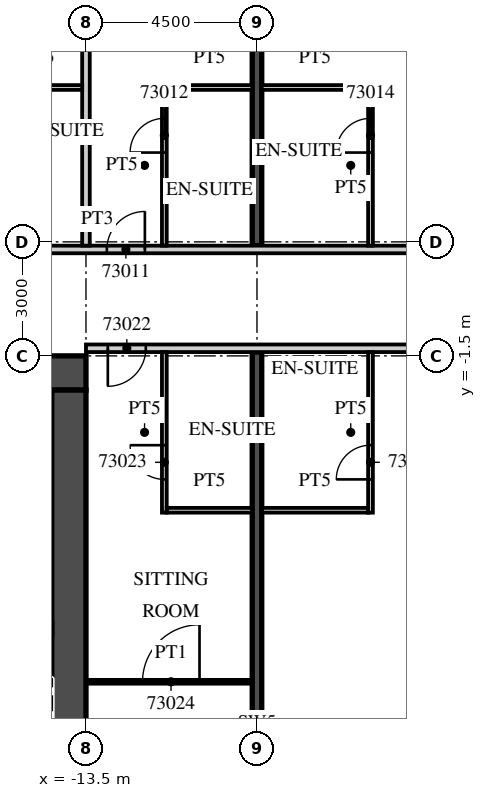
"""IFC4 building model, lengths in metres.
Left out: names, types, materials, properties, quantities, classifications, styles, units other than length and angle.
Written with IfcOpenShell. Run it as: python <this file> out.ifc"""

import sys

from ifc_helpers import new_model, si_unit, direction, frame, frame_2d, origin, place, context, subcontext, project, spatial, rectangle, extrude, element, fill, save


model = new_model("IFC4")
c1 = context("Model", 3, precision=1e-05, world=origin(), true_north=direction((0.0, 1.0)))
c2 = subcontext(c1, "Body", "Model", "MODEL_VIEW")
j1 = project(units=[si_unit("LENGTHUNIT", "METRE"), si_unit("PLANEANGLEUNIT", "RADIAN")], contexts=[c1])
p1 = place(None, origin())
s1 = spatial("IfcSite", under=j1, at=p1, CompositionType="ELEMENT")
p2 = place(p1, origin())
s2 = spatial("IfcBuilding", under=s1, at=p2, CompositionType="ELEMENT")
p3 = place(p2, frame((0.0, 0.0, 291.6)))
s3 = spatial("IfcBuildingStorey", under=s2, at=p3, CompositionType="ELEMENT", Elevation=291.6)
p4 = place(p3, frame((-9.0, -20.94, 0.0), z_axis=(0.0, 0.0, 1.0), x_axis=(0.0, 1.0, 0.0)))
e1 = element("IfcWall", 1, at=p4, inside=s3, PredefinedType="SHEAR", context=c2, shape_type="SweptSolid", body=[
    extrude(rectangle(XDim=19.541, YDim=0.25, at=frame_2d((9.77, 0.0))), origin(), (0.0, 0.0, 1.0), 3.3),
])
p5 = place(p3, frame((-9.0, 1.4, 0.0), z_axis=(0.0, 0.0, 1.0), x_axis=(0.0, 1.0, 0.0)))
e2 = element("IfcWall", 2, at=p5, inside=s3, PredefinedType="SHEAR", context=c2, shape_type="SweptSolid", body=[
    extrude(rectangle(XDim=16.896, YDim=0.25, at=frame_2d((8.448, 0.0))), origin(), (0.0, 0.0, 1.0), 3.3),
])
p6 = place(p3, frame((-39.909, 1.3, 0.0), z_axis=(0.0, 0.0, 1.0), x_axis=(1.0, 0.0, 0.0)))
e3 = element("IfcWall", 3, at=p6, inside=s3, PredefinedType="PARTITIONING", context=c2, shape_type="SweptSolid", body=[
    extrude(rectangle(XDim=53.409, YDim=0.2, at=frame_2d((26.705, 0.0))), origin(), (0.0, 0.0, 1.0), 3.02),
])
p7 = place(p6, frame((0.255, 0.0, 0.0)))
e4 = element("IfcOpeningElement", 4, at=p7, cuts=e3, PredefinedType="OPENING", context=c2, shape_type="SweptSolid", body=[
    extrude(rectangle(XDim=0.9, YDim=2.1, at=frame_2d((0.45, 1.05))), frame((0.0, 0.11, 0.0), z_axis=(0.0, -1.0, 0.0), x_axis=(1.0, 0.0, 0.0)), (0.0, 0.0, 1.0), 0.22),
])
p8 = place(p6, frame((6.347, 0.0, 0.0)))
e5 = element("IfcOpeningElement", 5, at=p8, cuts=e3, PredefinedType="OPENING", context=c2, shape_type="SweptSolid", body=[
    extrude(rectangle(XDim=1.2, YDim=2.1, at=frame_2d((0.6, 1.05))), frame((0.0, 0.11, 0.0), z_axis=(0.0, -1.0, 0.0), x_axis=(1.0, 0.0, 0.0)), (0.0, 0.0, 1.0), 0.22),
])
p9 = place(p6, frame((13.484, 0.0, 0.0)))
e6 = element("IfcOpeningElement", 6, at=p9, cuts=e3, PredefinedType="OPENING", context=c2, shape_type="SweptSolid", body=[
    extrude(rectangle(XDim=1.0, YDim=2.1, at=frame_2d((0.5, 1.05))), frame((0.0, 0.11, 0.0), z_axis=(0.0, -1.0, 0.0), x_axis=(1.0, 0.0, 0.0)), (0.0, 0.0, 1.0), 0.22),
])
p10 = place(p6, frame((20.334, 0.0, 0.0)))
e7 = element("IfcOpeningElement", 7, at=p10, cuts=e3, PredefinedType="OPENING", context=c2, shape_type="SweptSolid", body=[
    extrude(rectangle(XDim=1.0, YDim=2.1, at=frame_2d((0.5, 1.05))), frame((0.0, 0.11, 0.0), z_axis=(0.0, -1.0, 0.0), x_axis=(1.0, 0.0, 0.0)), (0.0, 0.0, 1.0), 0.22),
])
p11 = place(p6, frame((22.484, 0.0, 0.0)))
e8 = element("IfcOpeningElement", 8, at=p11, cuts=e3, PredefinedType="OPENING", context=c2, shape_type="SweptSolid", body=[
    extrude(rectangle(XDim=1.0, YDim=2.1, at=frame_2d((0.5, 1.05))), frame((0.0, 0.11, 0.0), z_axis=(0.0, -1.0, 0.0), x_axis=(1.0, 0.0, 0.0)), (0.0, 0.0, 1.0), 0.22),
])
p12 = place(p6, frame((26.959, 0.0, 0.0)))
e9 = element("IfcOpeningElement", 9, at=p12, cuts=e3, PredefinedType="OPENING", context=c2, shape_type="SweptSolid", body=[
    extrude(rectangle(XDim=1.0, YDim=2.1, at=frame_2d((0.5, 1.05))), frame((0.0, 0.11, 0.0), z_axis=(0.0, -1.0, 0.0), x_axis=(1.0, 0.0, 0.0)), (0.0, 0.0, 1.0), 0.22),
])
p13 = place(p6, frame((36.271, 0.0, 0.0)))
e10 = element("IfcOpeningElement", 10, at=p13, cuts=e3, PredefinedType="OPENING", context=c2, shape_type="SweptSolid", body=[
    extrude(rectangle(XDim=1.2, YDim=2.1, at=frame_2d((0.6, 1.05))), frame((0.0, 0.11, 0.0), z_axis=(0.0, -1.0, 0.0), x_axis=(1.0, 0.0, 0.0)), (0.0, 0.0, 1.0), 0.22),
])
p14 = place(p6, frame((40.484, 0.0, 0.0)))
e11 = element("IfcOpeningElement", 11, at=p14, cuts=e3, PredefinedType="OPENING", context=c2, shape_type="SweptSolid", body=[
    extrude(rectangle(XDim=1.0, YDim=2.1, at=frame_2d((0.5, 1.05))), frame((0.0, 0.11, 0.0), z_axis=(0.0, -1.0, 0.0), x_axis=(1.0, 0.0, 0.0)), (0.0, 0.0, 1.0), 0.22),
])
p15 = place(p6, frame((44.959, 0.0, 0.0)))
e12 = element("IfcOpeningElement", 12, at=p15, cuts=e3, PredefinedType="OPENING", context=c2, shape_type="SweptSolid", body=[
    extrude(rectangle(XDim=1.0, YDim=2.1, at=frame_2d((0.5, 1.05))), frame((0.0, 0.11, 0.0), z_axis=(0.0, -1.0, 0.0), x_axis=(1.0, 0.0, 0.0)), (0.0, 0.0, 1.0), 0.22),
])
p16 = place(p6, frame((51.834, 0.0, 0.0)))
e13 = element("IfcOpeningElement", 13, at=p16, cuts=e3, PredefinedType="OPENING", context=c2, shape_type="SweptSolid", body=[
    extrude(rectangle(XDim=1.0, YDim=2.1, at=frame_2d((0.5, 1.05))), frame((0.0, 0.11, 0.0), z_axis=(0.0, -1.0, 0.0), x_axis=(1.0, 0.0, 0.0)), (0.0, 0.0, 1.0), 0.22),
])
p17 = place(p3, frame((-13.5, 1.4, 0.0), z_axis=(0.0, 0.0, 1.0), x_axis=(0.0, 1.0, 0.0)))
e14 = element("IfcWall", 14, at=p17, inside=s3, PredefinedType="PARTITIONING", context=c2, shape_type="SweptSolid", body=[
    extrude(rectangle(XDim=16.485, YDim=0.2, at=frame_2d((8.243, 0.0))), origin(), (0.0, 0.0, 1.0), 3.02),
])
p18 = place(p3, frame((-15.85, 5.562, 0.0), z_axis=(0.0, 0.0, 1.0), x_axis=(1.0, 0.0, 0.0)))
e15 = element("IfcWall", 15, at=p18, inside=s3, PredefinedType="PARTITIONING", context=c2, shape_type="SweptSolid", body=[
    extrude(rectangle(XDim=2.25, YDim=0.125, at=frame_2d((1.125, 0.0))), origin(), (0.0, 0.0, 1.0), 3.02),
])
p19 = place(p3, frame((-11.438, 1.4, 0.0), z_axis=(0.0, 0.0, 1.0), x_axis=(0.0, 1.0, 0.0)))
e16 = element("IfcWall", 16, at=p19, inside=s3, PredefinedType="PARTITIONING", context=c2, shape_type="SweptSolid", body=[
    extrude(rectangle(XDim=4.225, YDim=0.125, at=frame_2d((2.113, 0.0))), origin(), (0.0, 0.0, 1.0), 3.02),
])
p20 = place(p19, frame((2.45, 0.0, 0.0)))
e17 = element("IfcOpeningElement", 17, at=p20, cuts=e16, PredefinedType="OPENING", context=c2, shape_type="SweptSolid", body=[
    extrude(rectangle(XDim=0.9, YDim=2.1, at=frame_2d((0.45, 1.05))), frame((0.0, 0.073, 0.0), z_axis=(0.0, -1.0, 0.0), x_axis=(1.0, 0.0, 0.0)), (0.0, 0.0, 1.0), 0.145),
])
p21 = place(p3, frame((-11.375, 5.562, 0.0), z_axis=(0.0, 0.0, 1.0), x_axis=(1.0, 0.0, 0.0)))
e18 = element("IfcWall", 18, at=p21, inside=s3, PredefinedType="PARTITIONING", context=c2, shape_type="SweptSolid", body=[
    extrude(rectangle(XDim=2.25, YDim=0.125, at=frame_2d((1.125, 0.0))), origin(), (0.0, 0.0, 1.0), 3.02),
])
p22 = place(p3, frame((-6.013, 1.4, 0.0), z_axis=(0.0, 0.0, 1.0), x_axis=(0.0, 1.0, 0.0)))
e19 = element("IfcWall", 19, at=p22, inside=s3, PredefinedType="PARTITIONING", context=c2, shape_type="SweptSolid", body=[
    extrude(rectangle(XDim=4.225, YDim=0.125, at=frame_2d((2.113, 0.0))), origin(), (0.0, 0.0, 1.0), 3.02),
])
p23 = place(p22, frame((2.45, 0.0, 0.0)))
e20 = element("IfcOpeningElement", 20, at=p23, cuts=e19, PredefinedType="OPENING", context=c2, shape_type="SweptSolid", body=[
    extrude(rectangle(XDim=0.9, YDim=2.1, at=frame_2d((0.45, 1.05))), frame((0.0, 0.073, 0.0), z_axis=(0.0, -1.0, 0.0), x_axis=(1.0, 0.0, 0.0)), (0.0, 0.0, 1.0), 0.145),
])
p24 = place(p3, frame((-8.875, 5.562, 0.0), z_axis=(0.0, 0.0, 1.0), x_axis=(1.0, 0.0, 0.0)))
e21 = element("IfcWall", 21, at=p24, inside=s3, PredefinedType="PARTITIONING", context=c2, shape_type="SweptSolid", body=[
    extrude(rectangle(XDim=2.8, YDim=0.125, at=frame_2d((1.4, 0.0))), origin(), (0.0, 0.0, 1.0), 3.02),
])
p25 = place(p3, frame((-13.5, -1.3, 0.0), z_axis=(0.0, 0.0, 1.0), x_axis=(1.0, 0.0, 0.0)))
e22 = element("IfcWall", 22, at=p25, inside=s3, PredefinedType="PARTITIONING", context=c2, shape_type="SweptSolid", body=[
    extrude(rectangle(XDim=50.293, YDim=0.2, at=frame_2d((25.146, 0.0))), origin(), (0.0, 0.0, 1.0), 3.02),
])
p26 = place(p25, frame((0.575, 0.0, 0.0)))
e23 = element("IfcOpeningElement", 23, at=p26, cuts=e22, PredefinedType="OPENING", context=c2, shape_type="SweptSolid", body=[
    extrude(rectangle(XDim=1.0, YDim=2.1, at=frame_2d((0.5, 1.05))), frame((0.0, 0.11, 0.0), z_axis=(0.0, -1.0, 0.0), x_axis=(1.0, 0.0, 0.0)), (0.0, 0.0, 1.0), 0.22),
])
p27 = place(p25, frame((9.863, 0.0, 0.0)))
e24 = element("IfcOpeningElement", 24, at=p27, cuts=e22, PredefinedType="OPENING", context=c2, shape_type="SweptSolid", body=[
    extrude(rectangle(XDim=1.2, YDim=2.1, at=frame_2d((0.6, 1.05))), frame((0.0, 0.11, 0.0), z_axis=(0.0, -1.0, 0.0), x_axis=(1.0, 0.0, 0.0)), (0.0, 0.0, 1.0), 0.22),
])
p28 = place(p25, frame((18.862, 0.0, 0.0)))
e25 = element("IfcOpeningElement", 25, at=p28, cuts=e22, PredefinedType="OPENING", context=c2, shape_type="SweptSolid", body=[
    extrude(rectangle(XDim=1.2, YDim=2.1, at=frame_2d((0.6, 1.05))), frame((0.0, 0.11, 0.0), z_axis=(0.0, -1.0, 0.0), x_axis=(1.0, 0.0, 0.0)), (0.0, 0.0, 1.0), 0.22),
])
p29 = place(p25, frame((25.45, 0.0, 0.0)))
e26 = element("IfcOpeningElement", 26, at=p29, cuts=e22, PredefinedType="OPENING", context=c2, shape_type="SweptSolid", body=[
    extrude(rectangle(XDim=1.0, YDim=2.1, at=frame_2d((0.5, 1.05))), frame((0.0, 0.11, 0.0), z_axis=(0.0, -1.0, 0.0), x_axis=(1.0, 0.0, 0.0)), (0.0, 0.0, 1.0), 0.22),
])
p30 = place(p25, frame((27.55, 0.0, 0.0)))
e27 = element("IfcOpeningElement", 27, at=p30, cuts=e22, PredefinedType="OPENING", context=c2, shape_type="SweptSolid", body=[
    extrude(rectangle(XDim=1.0, YDim=2.1, at=frame_2d((0.5, 1.05))), frame((0.0, 0.11, 0.0), z_axis=(0.0, -1.0, 0.0), x_axis=(1.0, 0.0, 0.0)), (0.0, 0.0, 1.0), 0.22),
])
p31 = place(p25, frame((33.938, 0.0, 0.0)))
e28 = element("IfcOpeningElement", 28, at=p31, cuts=e22, PredefinedType="OPENING", context=c2, shape_type="SweptSolid", body=[
    extrude(rectangle(XDim=1.2, YDim=2.1, at=frame_2d((0.6, 1.05))), frame((0.0, 0.11, 0.0), z_axis=(0.0, -1.0, 0.0), x_axis=(1.0, 0.0, 0.0)), (0.0, 0.0, 1.0), 0.22),
])
p32 = place(p25, frame((42.938, 0.0, 0.0)))
e29 = element("IfcOpeningElement", 29, at=p32, cuts=e22, PredefinedType="OPENING", context=c2, shape_type="SweptSolid", body=[
    extrude(rectangle(XDim=1.2, YDim=2.1, at=frame_2d((0.6, 1.05))), frame((0.0, 0.11, 0.0), z_axis=(0.0, -1.0, 0.0), x_axis=(1.0, 0.0, 0.0)), (0.0, 0.0, 1.0), 0.22),
])
p33 = place(p3, frame((-11.438, -5.625, 0.0), z_axis=(0.0, 0.0, 1.0), x_axis=(0.0, 1.0, 0.0)))
e30 = element("IfcWall", 30, at=p33, inside=s3, PredefinedType="PARTITIONING", context=c2, shape_type="SweptSolid", body=[
    extrude(rectangle(XDim=4.225, YDim=0.125, at=frame_2d((2.113, 0.0))), origin(), (0.0, 0.0, 1.0), 3.02),
])
p34 = place(p33, frame((0.875, 0.0, 0.0)))
e31 = element("IfcOpeningElement", 31, at=p34, cuts=e30, PredefinedType="OPENING", context=c2, shape_type="SweptSolid", body=[
    extrude(rectangle(XDim=0.9, YDim=2.1, at=frame_2d((0.45, 1.05))), frame((0.0, 0.073, 0.0), z_axis=(0.0, -1.0, 0.0), x_axis=(1.0, 0.0, 0.0)), (0.0, 0.0, 1.0), 0.145),
])
p35 = place(p3, frame((-11.375, -5.562, 0.0), z_axis=(0.0, 0.0, 1.0), x_axis=(1.0, 0.0, 0.0)))
e32 = element("IfcWall", 32, at=p35, inside=s3, PredefinedType="PARTITIONING", context=c2, shape_type="SweptSolid", body=[
    extrude(rectangle(XDim=2.25, YDim=0.125, at=frame_2d((1.125, 0.0))), origin(), (0.0, 0.0, 1.0), 3.02),
])
p36 = place(p3, frame((-13.4, -10.075, 0.0), z_axis=(0.0, 0.0, 1.0), x_axis=(1.0, 0.0, 0.0)))
e33 = element("IfcWall", 33, at=p36, inside=s3, PredefinedType="PARTITIONING", context=c2, shape_type="SweptSolid", body=[
    extrude(rectangle(XDim=4.275, YDim=0.1, at=frame_2d((2.137, 0.0))), origin(), (0.0, 0.0, 1.0), 3.02),
])
p37 = place(p36, frame((1.388, 0.0, 0.0)))
e34 = element("IfcOpeningElement", 34, at=p37, cuts=e33, PredefinedType="OPENING", context=c2, shape_type="SweptSolid", body=[
    extrude(rectangle(XDim=1.5, YDim=2.1, at=frame_2d((0.75, 1.05))), frame((0.0, 0.06, 0.0), z_axis=(0.0, -1.0, 0.0), x_axis=(1.0, 0.0, 0.0)), (0.0, 0.0, 1.0), 0.12),
])
p38 = place(p3, frame((-6.013, -5.625, 0.0), z_axis=(0.0, 0.0, 1.0), x_axis=(0.0, 1.0, 0.0)))
e35 = element("IfcWall", 35, at=p38, inside=s3, PredefinedType="PARTITIONING", context=c2, shape_type="SweptSolid", body=[
    extrude(rectangle(XDim=4.225, YDim=0.125, at=frame_2d((2.113, 0.0))), origin(), (0.0, 0.0, 1.0), 3.02),
])
p39 = place(p38, frame((0.875, 0.0, 0.0)))
e36 = element("IfcOpeningElement", 36, at=p39, cuts=e35, PredefinedType="OPENING", context=c2, shape_type="SweptSolid", body=[
    extrude(rectangle(XDim=0.9, YDim=2.1, at=frame_2d((0.45, 1.05))), frame((0.0, 0.073, 0.0), z_axis=(0.0, -1.0, 0.0), x_axis=(1.0, 0.0, 0.0)), (0.0, 0.0, 1.0), 0.145),
])
p40 = place(p3, frame((-8.875, -5.562, 0.0), z_axis=(0.0, 0.0, 1.0), x_axis=(1.0, 0.0, 0.0)))
e37 = element("IfcWall", 37, at=p40, inside=s3, PredefinedType="PARTITIONING", context=c2, shape_type="SweptSolid", body=[
    extrude(rectangle(XDim=2.8, YDim=0.125, at=frame_2d((1.4, 0.0))), origin(), (0.0, 0.0, 1.0), 3.02),
])
p41 = place(p3, frame((-31.5, -1.95, 0.0), z_axis=(0.0, 0.0, 1.0), x_axis=(1.0, 0.0, 0.0)))
e38 = element("IfcWall", 38, at=p41, inside=s3, PredefinedType="SHEAR", context=c2, shape_type="SweptSolid", body=[
    extrude(rectangle(XDim=18.0, YDim=0.9, at=frame_2d((9.0, 0.0))), origin(), (0.0, 0.0, 1.0), 3.02),
])
p42 = place(p41, frame((14.725, 0.0, 0.0)))
e39 = element("IfcOpeningElement", 39, at=p42, cuts=e38, PredefinedType="OPENING", context=c2, shape_type="SweptSolid", body=[
    extrude(rectangle(XDim=1.8, YDim=2.1, at=frame_2d((0.9, 1.05))), frame((0.0, 0.46, 0.0), z_axis=(0.0, -1.0, 0.0), x_axis=(1.0, 0.0, 0.0)), (0.0, 0.0, 1.0), 0.92),
])
p43 = place(p3, frame((-13.95, -14.6, 0.0), z_axis=(0.0, 0.0, 1.0), x_axis=(0.0, 1.0, 0.0)))
e40 = element("IfcWall", 40, at=p43, inside=s3, PredefinedType="SHEAR", context=c2, shape_type="SweptSolid", body=[
    extrude(rectangle(XDim=12.2, YDim=0.9, at=frame_2d((6.1, 0.0))), origin(), (0.0, 0.0, 1.0), 3.02),
])
p44 = place(p12, origin())
e41 = element("IfcDoor", 41, at=p44, inside=s3, OperationType="SINGLE_SWING_RIGHT", PredefinedType="DOOR", context=c2, shape_type="SweptSolid", body=[
    extrude(rectangle(XDim=1.0, YDim=2.1, at=frame_2d((0.5, 1.05))), frame((0.0, 0.025, 0.0), z_axis=(0.0, -1.0, 0.0), x_axis=(1.0, 0.0, 0.0)), (0.0, 0.0, 1.0), 0.05),
])
fill(e9, e41)
p45 = place(p20, origin())
e42 = element("IfcDoor", 42, at=p45, inside=s3, OperationType="SINGLE_SWING_LEFT", PredefinedType="DOOR", context=c2, shape_type="SweptSolid", body=[
    extrude(rectangle(XDim=0.9, YDim=2.1, at=frame_2d((0.45, 1.05))), frame((0.0, 0.025, 0.0), z_axis=(0.0, -1.0, 0.0), x_axis=(1.0, 0.0, 0.0)), (0.0, 0.0, 1.0), 0.05),
])
fill(e17, e42)
p46 = place(p23, origin())
e43 = element("IfcDoor", 43, at=p46, inside=s3, OperationType="SINGLE_SWING_LEFT", PredefinedType="DOOR", context=c2, shape_type="SweptSolid", body=[
    extrude(rectangle(XDim=0.9, YDim=2.1, at=frame_2d((0.45, 1.05))), frame((0.0, 0.025, 0.0), z_axis=(0.0, -1.0, 0.0), x_axis=(1.0, 0.0, 0.0)), (0.0, 0.0, 1.0), 0.05),
])
fill(e20, e43)
p47 = place(p26, origin())
e44 = element("IfcDoor", 44, at=p47, inside=s3, OperationType="SINGLE_SWING_LEFT", PredefinedType="DOOR", context=c2, shape_type="SweptSolid", body=[
    extrude(rectangle(XDim=1.0, YDim=2.1, at=frame_2d((0.5, 1.05))), frame((0.0, 0.025, 0.0), z_axis=(0.0, -1.0, 0.0), x_axis=(1.0, 0.0, 0.0)), (0.0, 0.0, 1.0), 0.05),
])
fill(e23, e44)
p48 = place(p34, origin())
e45 = element("IfcDoor", 45, at=p48, inside=s3, OperationType="SINGLE_SWING_RIGHT", PredefinedType="DOOR", context=c2, shape_type="SweptSolid", body=[
    extrude(rectangle(XDim=0.9, YDim=2.1, at=frame_2d((0.45, 1.05))), frame((0.0, 0.025, 0.0), z_axis=(0.0, -1.0, 0.0), x_axis=(1.0, 0.0, 0.0)), (0.0, 0.0, 1.0), 0.05),
])
fill(e31, e45)
p49 = place(p37, origin())
e46 = element("IfcDoor", 46, at=p49, inside=s3, OperationType="SINGLE_SWING_RIGHT", PredefinedType="DOOR", context=c2, shape_type="SweptSolid", body=[
    extrude(rectangle(XDim=1.5, YDim=2.1, at=frame_2d((0.75, 1.05))), frame((0.0, 0.025, 0.0), z_axis=(0.0, -1.0, 0.0), x_axis=(1.0, 0.0, 0.0)), (0.0, 0.0, 1.0), 0.05),
])
fill(e34, e46)
p50 = place(p39, origin())
e47 = element("IfcDoor", 47, at=p50, inside=s3, OperationType="SINGLE_SWING_LEFT", PredefinedType="DOOR", context=c2, shape_type="SweptSolid", body=[
    extrude(rectangle(XDim=0.9, YDim=2.1, at=frame_2d((0.45, 1.05))), frame((0.0, 0.025, 0.0), z_axis=(0.0, -1.0, 0.0), x_axis=(1.0, 0.0, 0.0)), (0.0, 0.0, 1.0), 0.05),
])
fill(e36, e47)
save(model, sys.argv[1])
